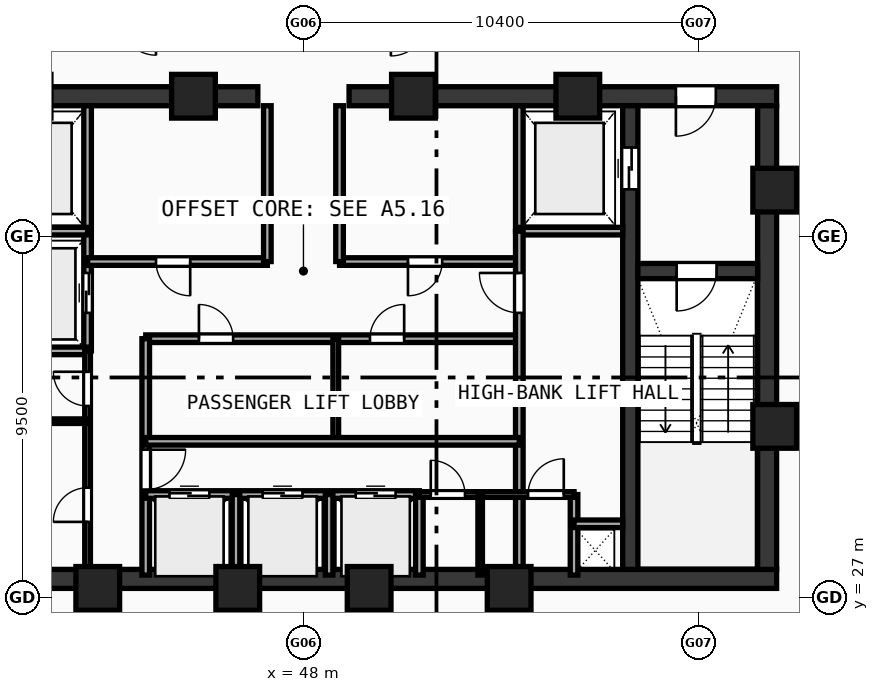
"""IFC4 building model, lengths in metres.
Left out: names, types, materials, properties, quantities, classifications, styles, units other than length and angle.
Written with IfcOpenShell. Run it as: python <this file> out.ifc"""

import sys

from ifc_helpers import new_model, si_unit, direction, frame, frame_2d, origin, origin_with_axes, origin_2d, place, context, subcontext, project, spatial, rectangle, hollow_rectangle, extrude, source, transform, mapped, element, fill, save


model = new_model("IFC4")
c1 = context("Model", 3, precision=1e-05, world=origin(), true_north=direction((0.0, 1.0)))
c2 = subcontext(c1, "Body", "Model", "MODEL_VIEW")
j1 = project(units=[si_unit("LENGTHUNIT", "METRE"), si_unit("PLANEANGLEUNIT", "RADIAN")], contexts=[c1])
p1 = place(None, origin())
s1 = spatial("IfcSite", under=j1, at=p1, CompositionType="ELEMENT")
p2 = place(p1, origin())
s2 = spatial("IfcBuilding", under=s1, at=p2, CompositionType="ELEMENT")
p3 = place(p2, frame((0.0, 0.0, 288.75)))
s3 = spatial("IfcBuildingStorey", under=s2, at=p3, CompositionType="ELEMENT", Elevation=288.75)
p4 = place(p3, frame((35.55, 27.5, 0.0), z_axis=(0.0, 0.0, 1.0), x_axis=(1.0, 0.0, 0.0)))
e1 = element("IfcWall", 1, at=p4, inside=s3, PredefinedType="SHEAR", context=c2, shape_type="SweptSolid", body=[
    extrude(rectangle(XDim=24.9, YDim=0.5, at=frame_2d((12.45, 0.0))), origin(), (0.0, 0.0, 1.0), 3.47),
])
p5 = place(p3, frame((35.55, 40.2, 0.0), z_axis=(0.0, 0.0, 1.0), x_axis=(1.0, 0.0, 0.0)))
e2 = element("IfcWall", 2, at=p5, inside=s3, PredefinedType="SHEAR", context=c2, shape_type="SweptSolid", body=[
    extrude(rectangle(XDim=11.25, YDim=0.5, at=frame_2d((5.625, 0.0))), origin(), (0.0, 0.0, 1.0), 3.47),
])
p6 = place(p5, frame((1.6, 0.0, 0.0)))
e3 = element("IfcOpeningElement", 3, at=p6, cuts=e2, PredefinedType="OPENING", context=c2, shape_type="SweptSolid", body=[
    extrude(rectangle(XDim=1.05, YDim=2.1, at=frame_2d((0.525, 1.05))), frame((0.0, 0.26, 0.0), z_axis=(0.0, -1.0, 0.0), x_axis=(1.0, 0.0, 0.0)), (0.0, 0.0, 1.0), 0.52),
])
p7 = place(p3, frame((49.2, 40.2, 0.0), z_axis=(0.0, 0.0, 1.0), x_axis=(1.0, 0.0, 0.0)))
e4 = element("IfcWall", 4, at=p7, inside=s3, PredefinedType="SHEAR", context=c2, shape_type="SweptSolid", body=[
    extrude(rectangle(XDim=11.25, YDim=0.5, at=frame_2d((5.625, 0.0))), origin(), (0.0, 0.0, 1.0), 3.47),
])
p8 = place(p7, frame((8.6, 0.0, 0.0)))
e5 = element("IfcOpeningElement", 5, at=p8, cuts=e4, PredefinedType="OPENING", context=c2, shape_type="SweptSolid", body=[
    extrude(rectangle(XDim=1.05, YDim=2.1, at=frame_2d((0.525, 1.05))), frame((0.0, 0.26, 0.0), z_axis=(0.0, -1.0, 0.0), x_axis=(1.0, 0.0, 0.0)), (0.0, 0.0, 1.0), 0.52),
])
p9 = place(p3, frame((60.2, 27.75, 0.0), z_axis=(0.0, 0.0, 1.0), x_axis=(0.0, 1.0, 0.0)))
e6 = element("IfcWall", 6, at=p9, inside=s3, PredefinedType="SHEAR", context=c2, shape_type="SweptSolid", body=[
    extrude(rectangle(XDim=12.2, YDim=0.5, at=frame_2d((6.1, 0.0))), origin(), (0.0, 0.0, 1.0), 3.47),
])
p10 = place(p3, frame((56.6, 27.75, 0.0), z_axis=(0.0, 0.0, 1.0), x_axis=(0.0, 1.0, 0.0)))
e7 = element("IfcWall", 7, at=p10, inside=s3, PredefinedType="SHEAR", context=c2, shape_type="SweptSolid", body=[
    extrude(rectangle(XDim=12.2, YDim=0.4, at=frame_2d((6.1, 0.0))), origin(), (0.0, 0.0, 1.0), 3.47),
])
p11 = place(p10, frame((10.0, 0.0, 0.0)))
e8 = element("IfcOpeningElement", 8, at=p11, cuts=e7, PredefinedType="OPENING", context=c2, shape_type="SweptSolid", body=[
    extrude(rectangle(XDim=1.1, YDim=2.1, at=frame_2d((0.55, 1.05))), frame((0.0, 0.21, 0.0), z_axis=(0.0, -1.0, 0.0), x_axis=(1.0, 0.0, 0.0)), (0.0, 0.0, 1.0), 0.42),
])
p12 = place(p3, frame((56.8, 35.6, 0.0), z_axis=(0.0, 0.0, 1.0), x_axis=(1.0, 0.0, 0.0)))
e9 = element("IfcWall", 9, at=p12, inside=s3, PredefinedType="SHEAR", context=c2, shape_type="SweptSolid", body=[
    extrude(rectangle(XDim=3.15, YDim=0.4, at=frame_2d((1.575, 0.0))), origin(), (0.0, 0.0, 1.0), 3.47),
])
p13 = place(p12, frame((1.02, 0.0, 0.0)))
e10 = element("IfcOpeningElement", 10, at=p13, cuts=e9, PredefinedType="OPENING", context=c2, shape_type="SweptSolid", body=[
    extrude(rectangle(XDim=1.05, YDim=2.1, at=frame_2d((0.525, 1.05))), frame((0.0, 0.21, 0.0), z_axis=(0.0, -1.0, 0.0), x_axis=(1.0, 0.0, 0.0)), (0.0, 0.0, 1.0), 0.42),
])
m1 = source(origin(), c2, "Body", "SweptSolid", [
    extrude(hollow_rectangle(XDim=1.15, YDim=1.15, WallThickness=0.048, at=origin_2d()), origin(), (0.0, 0.0, 1.0), 3.73),
])
for number, where, z_axis, x_axis in (
    (11, (42.588, 27.25, -0.26), (0.0, 0.0, 1.0), (1.0, 0.0, 0.0)),
    (12, (46.272, 27.25, -0.26), (0.0, 0.0, 1.0), (1.0, 0.0, 0.0)),
    (13, (49.729, 27.25, -0.26), (0.0, 0.0, 1.0), (1.0, 0.0, 0.0)),
    (14, (53.412, 27.25, -0.26), (0.0, 0.0, 1.0), (1.0, 0.0, 0.0)),
    (15, (60.4, 31.513, -0.26), (0.0, 0.0, 1.0), (1.0, 0.0, 0.0)),
    (16, (60.4, 37.729, -0.26), (0.0, 0.0, 1.0), (1.0, 0.0, 0.0)),
    (17, (55.219, 40.2, -0.26), (0.0, 0.0, 1.0), (1.0, 0.0, 0.0)),
    (18, (50.894, 40.2, -0.26), (0.0, 0.0, 1.0), (1.0, 0.0, 0.0)),
    (19, (45.106, 40.2, -0.26), (0.0, 0.0, 1.0), (1.0, 0.0, 0.0)),
):
    element("IfcColumn", number, at=place(p3, frame(where, z_axis=z_axis, x_axis=x_axis)), inside=s3, PredefinedType="COLUMN", context=c2, shape_type="MappedRepresentation", body=[
        mapped(m1, transform((0.0, 0.0, 0.0), scale=1.0)),
    ])
p14 = place(p3, frame((42.32, 33.5, 0.0), z_axis=(0.0, 0.0, 1.0), x_axis=(0.0, 1.0, 0.0)))
e20 = element("IfcWall", 20, at=p14, inside=s3, PredefinedType="SOLIDWALL", context=c2, shape_type="SweptSolid", body=[
    extrude(rectangle(XDim=6.45, YDim=0.2, at=frame_2d((3.225, 0.0))), origin(), (0.0, 0.0, 1.0), 3.47),
])
p15 = place(p14, frame((1.0, 0.0, 0.0)))
e21 = element("IfcOpeningElement", 21, at=p15, cuts=e20, PredefinedType="OPENING", context=c2, shape_type="SweptSolid", body=[
    extrude(rectangle(XDim=1.05, YDim=2.1, at=frame_2d((0.525, 1.05))), frame((0.0, 0.11, 0.0), z_axis=(0.0, -1.0, 0.0), x_axis=(1.0, 0.0, 0.0)), (0.0, 0.0, 1.0), 0.22),
])
for number, where, z_axis, x_axis in (
    (22, (39.6, 36.65, 0.0), (0.0, 0.0, 1.0), (1.0, 0.0, 0.0)),
    (23, (39.6, 33.5, 0.0), (0.0, 0.0, 1.0), (1.0, 0.0, 0.0)),
):
    element("IfcWall", number, at=place(p3, frame(where, z_axis=z_axis, x_axis=x_axis)), inside=s3, PredefinedType="SOLIDWALL", context=c2, shape_type="SweptSolid", body=[
        extrude(rectangle(XDim=2.72, YDim=0.2, at=frame_2d((1.36, 0.0))), origin(), (0.0, 0.0, 1.0), 3.47),
    ])
p16 = place(p3, frame((53.68, 36.65, 0.0), z_axis=(0.0, 0.0, 1.0), x_axis=(0.0, 1.0, 0.0)))
e24 = element("IfcWall", 24, at=p16, inside=s3, PredefinedType="SOLIDWALL", context=c2, shape_type="SweptSolid", body=[
    extrude(rectangle(XDim=3.3, YDim=0.2, at=frame_2d((1.65, 0.0))), origin(), (0.0, 0.0, 1.0), 3.47),
])
p17 = place(p3, frame((53.68, 36.65, 0.0), z_axis=(0.0, 0.0, 1.0), x_axis=(1.0, 0.0, 0.0)))
e25 = element("IfcWall", 25, at=p17, inside=s3, PredefinedType="SOLIDWALL", context=c2, shape_type="SweptSolid", body=[
    extrude(rectangle(XDim=2.72, YDim=0.2, at=frame_2d((1.36, 0.0))), origin(), (0.0, 0.0, 1.0), 3.47),
])
p18 = place(p3, frame((42.32, 35.85, 0.0), z_axis=(0.0, 0.0, 1.0), x_axis=(1.0, 0.0, 0.0)))
e26 = element("IfcWall", 26, at=p18, inside=s3, PredefinedType="SOLIDWALL", context=c2, shape_type="SweptSolid", body=[
    extrude(rectangle(XDim=4.73, YDim=0.2, at=frame_2d((2.365, 0.0))), origin(), (0.0, 0.0, 1.0), 3.47),
])
p19 = place(p18, frame((1.8, 0.0, 0.0)))
e27 = element("IfcOpeningElement", 27, at=p19, cuts=e26, PredefinedType="OPENING", context=c2, shape_type="SweptSolid", body=[
    extrude(rectangle(XDim=0.9, YDim=2.1, at=frame_2d((0.45, 1.05))), frame((0.0, 0.11, 0.0), z_axis=(0.0, -1.0, 0.0), x_axis=(1.0, 0.0, 0.0)), (0.0, 0.0, 1.0), 0.22),
])
p20 = place(p3, frame((48.95, 35.85, 0.0), z_axis=(0.0, 0.0, 1.0), x_axis=(1.0, 0.0, 0.0)))
e28 = element("IfcWall", 28, at=p20, inside=s3, PredefinedType="SOLIDWALL", context=c2, shape_type="SweptSolid", body=[
    extrude(rectangle(XDim=4.73, YDim=0.2, at=frame_2d((2.365, 0.0))), origin(), (0.0, 0.0, 1.0), 3.47),
])
p21 = place(p20, frame((1.8, 0.0, 0.0)))
e29 = element("IfcOpeningElement", 29, at=p21, cuts=e28, PredefinedType="OPENING", context=c2, shape_type="SweptSolid", body=[
    extrude(rectangle(XDim=0.9, YDim=2.1, at=frame_2d((0.45, 1.05))), frame((0.0, 0.11, 0.0), z_axis=(0.0, -1.0, 0.0), x_axis=(1.0, 0.0, 0.0)), (0.0, 0.0, 1.0), 0.22),
])
for number, where, z_axis, x_axis in (
    (30, (47.05, 35.85, 0.0), (0.0, 0.0, 1.0), (0.0, 1.0, 0.0)),
    (31, (48.95, 35.85, 0.0), (0.0, 0.0, 1.0), (0.0, 1.0, 0.0)),
):
    element("IfcWall", number, at=place(p3, frame(where, z_axis=z_axis, x_axis=x_axis)), inside=s3, PredefinedType="SOLIDWALL", context=c2, shape_type="SweptSolid", body=[
        extrude(rectangle(XDim=4.1, YDim=0.2, at=frame_2d((2.05, 0.0))), origin(), (0.0, 0.0, 1.0), 3.47),
    ])
p22 = place(p3, frame((43.85, 33.82, 0.0), z_axis=(0.0, 0.0, 1.0), x_axis=(1.0, 0.0, 0.0)))
e32 = element("IfcWall", 32, at=p22, inside=s3, PredefinedType="SOLIDWALL", context=c2, shape_type="SweptSolid", body=[
    extrude(rectangle(XDim=9.83, YDim=0.2, at=frame_2d((4.915, 0.0))), origin(), (0.0, 0.0, 1.0), 3.47),
])
p23 = place(p22, frame((1.4, 0.0, 0.0)))
e33 = element("IfcOpeningElement", 33, at=p23, cuts=e32, PredefinedType="OPENING", context=c2, shape_type="SweptSolid", body=[
    extrude(rectangle(XDim=0.9, YDim=2.1, at=frame_2d((0.45, 1.05))), frame((0.0, 0.11, 0.0), z_axis=(0.0, -1.0, 0.0), x_axis=(1.0, 0.0, 0.0)), (0.0, 0.0, 1.0), 0.22),
])
p24 = place(p22, frame((5.9, 0.0, 0.0)))
e34 = element("IfcOpeningElement", 34, at=p24, cuts=e32, PredefinedType="OPENING", context=c2, shape_type="SweptSolid", body=[
    extrude(rectangle(XDim=0.9, YDim=2.1, at=frame_2d((0.45, 1.05))), frame((0.0, 0.11, 0.0), z_axis=(0.0, -1.0, 0.0), x_axis=(1.0, 0.0, 0.0)), (0.0, 0.0, 1.0), 0.22),
])
p25 = place(p3, frame((43.85, 27.6, 0.0), z_axis=(0.0, 0.0, 1.0), x_axis=(0.0, 1.0, 0.0)))
e35 = element("IfcWall", 35, at=p25, inside=s3, PredefinedType="SOLIDWALL", context=c2, shape_type="SweptSolid", body=[
    extrude(rectangle(XDim=6.22, YDim=0.2, at=frame_2d((3.11, 0.0))), origin(), (0.0, 0.0, 1.0), 3.47),
])
p26 = place(p25, frame((2.25, 0.0, 0.0)))
e36 = element("IfcOpeningElement", 36, at=p26, cuts=e35, PredefinedType="OPENING", context=c2, shape_type="SweptSolid", body=[
    extrude(rectangle(XDim=1.05, YDim=2.1, at=frame_2d((0.525, 1.05))), frame((0.0, 0.11, 0.0), z_axis=(0.0, -1.0, 0.0), x_axis=(1.0, 0.0, 0.0)), (0.0, 0.0, 1.0), 0.22),
])
p27 = place(p3, frame((53.68, 27.6, 0.0), z_axis=(0.0, 0.0, 1.0), x_axis=(0.0, 1.0, 0.0)))
e37 = element("IfcWall", 37, at=p27, inside=s3, PredefinedType="SOLIDWALL", context=c2, shape_type="SweptSolid", body=[
    extrude(rectangle(XDim=9.05, YDim=0.2, at=frame_2d((4.525, 0.0))), origin(), (0.0, 0.0, 1.0), 3.47),
])
p28 = place(p27, frame((6.9, 0.0, 0.0)))
e38 = element("IfcOpeningElement", 38, at=p28, cuts=e37, PredefinedType="OPENING", context=c2, shape_type="SweptSolid", body=[
    extrude(rectangle(XDim=1.05, YDim=2.1, at=frame_2d((0.525, 1.05))), frame((0.0, 0.11, 0.0), z_axis=(0.0, -1.0, 0.0), x_axis=(1.0, 0.0, 0.0)), (0.0, 0.0, 1.0), 0.22),
])
p29 = place(p3, frame((48.85, 31.12, 0.0), z_axis=(0.0, 0.0, 1.0), x_axis=(0.0, 1.0, 0.0)))
e39 = element("IfcWall", 39, at=p29, inside=s3, PredefinedType="PARTITIONING", context=c2, shape_type="SweptSolid", body=[
    extrude(rectangle(XDim=2.7, YDim=0.15, at=frame_2d((1.35, 0.0))), origin(), (0.0, 0.0, 1.0), 3.47),
])
p30 = place(p3, frame((43.85, 29.72, 0.0), z_axis=(0.0, 0.0, 1.0), x_axis=(1.0, 0.0, 0.0)))
e40 = element("IfcWall", 40, at=p30, inside=s3, PredefinedType="SOLIDWALL", context=c2, shape_type="SweptSolid", body=[
    extrude(rectangle(XDim=7.2, YDim=0.2, at=frame_2d((3.6, 0.0))), origin(), (0.0, 0.0, 1.0), 3.47),
])
p31 = place(p30, frame((0.625, 0.0, 0.0)))
e41 = element("IfcOpeningElement", 41, at=p31, cuts=e40, PredefinedType="OPENING", context=c2, shape_type="SweptSolid", body=[
    extrude(rectangle(XDim=1.05, YDim=2.1, at=frame_2d((0.525, 1.05))), frame((0.0, 0.11, 0.0), z_axis=(0.0, -1.0, 0.0), x_axis=(1.0, 0.0, 0.0)), (0.0, 0.0, 1.0), 0.22),
])
p32 = place(p30, frame((3.075, 0.0, 0.0)))
e42 = element("IfcOpeningElement", 42, at=p32, cuts=e40, PredefinedType="OPENING", context=c2, shape_type="SweptSolid", body=[
    extrude(rectangle(XDim=1.05, YDim=2.1, at=frame_2d((0.525, 1.05))), frame((0.0, 0.11, 0.0), z_axis=(0.0, -1.0, 0.0), x_axis=(1.0, 0.0, 0.0)), (0.0, 0.0, 1.0), 0.22),
])
p33 = place(p30, frame((5.525, 0.0, 0.0)))
e43 = element("IfcOpeningElement", 43, at=p33, cuts=e40, PredefinedType="OPENING", context=c2, shape_type="SweptSolid", body=[
    extrude(rectangle(XDim=1.05, YDim=2.1, at=frame_2d((0.525, 1.05))), frame((0.0, 0.11, 0.0), z_axis=(0.0, -1.0, 0.0), x_axis=(1.0, 0.0, 0.0)), (0.0, 0.0, 1.0), 0.22),
])
p34 = place(p3, frame((51.05, 27.6, 0.0), z_axis=(0.0, 0.0, 1.0), x_axis=(0.0, 1.0, 0.0)))
e44 = element("IfcWall", 44, at=p34, inside=s3, PredefinedType="SOLIDWALL", context=c2, shape_type="SweptSolid", body=[
    extrude(rectangle(XDim=2.12, YDim=0.2, at=frame_2d((1.06, 0.0))), origin(), (0.0, 0.0, 1.0), 3.47),
])
p35 = place(p3, frame((43.85, 31.12, 0.0), z_axis=(0.0, 0.0, 1.0), x_axis=(1.0, 0.0, 0.0)))
e45 = element("IfcWall", 45, at=p35, inside=s3, PredefinedType="SOLIDWALL", context=c2, shape_type="SweptSolid", body=[
    extrude(rectangle(XDim=9.83, YDim=0.2, at=frame_2d((4.915, 0.0))), origin(), (0.0, 0.0, 1.0), 3.47),
])
for number, where, z_axis, x_axis in (
    (46, (46.225, 27.6, 0.0), (0.0, 0.0, 1.0), (0.0, 1.0, 0.0)),
    (47, (48.675, 27.6, 0.0), (0.0, 0.0, 1.0), (0.0, 1.0, 0.0)),
    (48, (55.12, 27.6, 0.0), (0.0, 0.0, 1.0), (0.0, 1.0, 0.0)),
):
    element("IfcWall", number, at=place(p3, frame(where, z_axis=z_axis, x_axis=x_axis)), inside=s3, PredefinedType="SOLIDWALL", context=c2, shape_type="SweptSolid", body=[
        extrude(rectangle(XDim=2.12, YDim=0.2, at=frame_2d((1.06, 0.0))), origin(), (0.0, 0.0, 1.0), 3.47),
    ])
p36 = place(p3, frame((55.12, 28.95, 0.0), z_axis=(0.0, 0.0, 1.0), x_axis=(1.0, 0.0, 0.0)))
e49 = element("IfcWall", 49, at=p36, inside=s3, PredefinedType="SOLIDWALL", context=c2, shape_type="SweptSolid", body=[
    extrude(rectangle(XDim=1.28, YDim=0.2, at=frame_2d((0.64, 0.0))), origin(), (0.0, 0.0, 1.0), 3.47),
])
p37 = place(p3, frame((42.32, 27.6, 0.0), z_axis=(0.0, 0.0, 1.0), x_axis=(0.0, 1.0, 0.0)))
e50 = element("IfcWall", 50, at=p37, inside=s3, PredefinedType="PARTITIONING", context=c2, shape_type="SweptSolid", body=[
    extrude(rectangle(XDim=5.9, YDim=0.15, at=frame_2d((2.95, 0.0))), origin(), (0.0, 0.0, 1.0), 3.47),
])
p38 = place(p37, frame((1.4, 0.0, 0.0)))
e51 = element("IfcOpeningElement", 51, at=p38, cuts=e50, PredefinedType="OPENING", context=c2, shape_type="SweptSolid", body=[
    extrude(rectangle(XDim=0.9, YDim=2.1, at=frame_2d((0.45, 1.05))), frame((0.0, 0.085, 0.0), z_axis=(0.0, -1.0, 0.0), x_axis=(1.0, 0.0, 0.0)), (0.0, 0.0, 1.0), 0.17),
])
p39 = place(p37, frame((4.45, 0.0, 0.0)))
e52 = element("IfcOpeningElement", 52, at=p39, cuts=e50, PredefinedType="OPENING", context=c2, shape_type="SweptSolid", body=[
    extrude(rectangle(XDim=0.9, YDim=2.1, at=frame_2d((0.45, 1.05))), frame((0.0, 0.085, 0.0), z_axis=(0.0, -1.0, 0.0), x_axis=(1.0, 0.0, 0.0)), (0.0, 0.0, 1.0), 0.17),
])
p40 = place(p3, frame((51.05, 29.72, 0.0), z_axis=(0.0, 0.0, 1.0), x_axis=(1.0, 0.0, 0.0)))
e53 = element("IfcWall", 53, at=p40, inside=s3, PredefinedType="PARTITIONING", context=c2, shape_type="SweptSolid", body=[
    extrude(rectangle(XDim=4.07, YDim=0.15, at=frame_2d((2.035, 0.0))), origin(), (0.0, 0.0, 1.0), 3.47),
])
p41 = place(p40, frame((0.3, 0.0, 0.0)))
e54 = element("IfcOpeningElement", 54, at=p41, cuts=e53, PredefinedType="OPENING", context=c2, shape_type="SweptSolid", body=[
    extrude(rectangle(XDim=0.9, YDim=2.1, at=frame_2d((0.45, 1.05))), frame((0.0, 0.085, 0.0), z_axis=(0.0, -1.0, 0.0), x_axis=(1.0, 0.0, 0.0)), (0.0, 0.0, 1.0), 0.17),
])
p42 = place(p40, frame((2.86, 0.0, 0.0)))
e55 = element("IfcOpeningElement", 55, at=p42, cuts=e53, PredefinedType="OPENING", context=c2, shape_type="SweptSolid", body=[
    extrude(rectangle(XDim=0.94, YDim=2.1, at=frame_2d((0.47, 1.05))), frame((0.0, 0.085, 0.0), z_axis=(0.0, -1.0, 0.0), x_axis=(1.0, 0.0, 0.0)), (0.0, 0.0, 1.0), 0.17),
])
p43 = place(p3, frame((39.6, 31.65, 0.0), z_axis=(0.0, 0.0, 1.0), x_axis=(1.0, 0.0, 0.0)))
e56 = element("IfcWall", 56, at=p43, inside=s3, PredefinedType="PARTITIONING", context=c2, shape_type="SweptSolid", body=[
    extrude(rectangle(XDim=2.72, YDim=0.12, at=frame_2d((1.36, 0.0))), origin(), (0.0, 0.0, 1.0), 3.47),
])
p44 = place(p3, frame((52.65, 27.6, 0.0), z_axis=(0.0, 0.0, 1.0), x_axis=(0.0, 1.0, 0.0)))
e57 = element("IfcWall", 57, at=p44, inside=s3, PredefinedType="PARTITIONING", context=c2, shape_type="SweptSolid", body=[
    extrude(rectangle(XDim=2.12, YDim=0.12, at=frame_2d((1.06, 0.0))), origin(), (0.0, 0.0, 1.0), 3.47),
])
m2 = source(origin(), c2, "Body", "SweptSolid", [
    extrude(rectangle(XDim=1.05, YDim=2.1, at=frame_2d((0.525, 1.05))), frame((0.0, 0.025, 0.0), z_axis=(0.0, -1.0, 0.0), x_axis=(1.0, 0.0, 0.0)), (0.0, 0.0, 1.0), 0.05),
])
p45 = place(p13, frame((1.05, 0.0, 0.0), z_axis=(0.0, 0.0, 1.0), x_axis=(-1.0, 0.0, 0.0)))
e58 = element("IfcDoor", 58, at=p45, inside=s3, OperationType="SINGLE_SWING_RIGHT", PredefinedType="DOOR", context=c2, shape_type="MappedRepresentation", body=[
    mapped(m2, transform((0.0, 0.0, 0.0), scale=1.0)),
])
fill(e10, e58)
p46 = place(p8, frame((1.05, 0.0, 0.0), z_axis=(0.0, 0.0, 1.0), x_axis=(-1.0, 0.0, 0.0)))
e59 = element("IfcDoor", 59, at=p46, inside=s3, OperationType="SINGLE_SWING_RIGHT", PredefinedType="DOOR", context=c2, shape_type="MappedRepresentation", body=[
    mapped(m2, transform((0.0, 0.0, 0.0), scale=1.0)),
])
fill(e5, e59)
m3 = source(origin(), c2, "Body", "SweptSolid", [
    extrude(rectangle(XDim=1.1, YDim=2.1, at=frame_2d((0.55, 1.05))), frame((0.0, 0.025, 0.0), z_axis=(0.0, -1.0, 0.0), x_axis=(1.0, 0.0, 0.0)), (0.0, 0.0, 1.0), 0.05),
])
p47 = place(p11, origin_with_axes())
e60 = element("IfcDoor", 60, at=p47, inside=s3, OperationType="DOUBLE_DOOR_SLIDING", PredefinedType="DOOR", context=c2, shape_type="MappedRepresentation", body=[
    mapped(m3, transform((0.0, 0.0, 0.0), scale=1.0)),
])
fill(e8, e60)
p48 = place(p15, origin_with_axes())
e61 = element("IfcDoor", 61, at=p48, inside=s3, OperationType="DOUBLE_DOOR_SLIDING", PredefinedType="DOOR", context=c2, shape_type="MappedRepresentation", body=[
    mapped(m2, transform((0.0, 0.0, 0.0), scale=1.0)),
])
fill(e21, e61)
m4 = source(origin(), c2, "Body", "SweptSolid", [
    extrude(rectangle(XDim=0.9, YDim=2.1, at=frame_2d((0.45, 1.05))), frame((0.0, 0.025, 0.0), z_axis=(0.0, -1.0, 0.0), x_axis=(1.0, 0.0, 0.0)), (0.0, 0.0, 1.0), 0.05),
])
p49 = place(p19, frame((0.9, 0.0, 0.0), z_axis=(0.0, 0.0, 1.0), x_axis=(-1.0, 0.0, 0.0)))
e62 = element("IfcDoor", 62, at=p49, inside=s3, OperationType="SINGLE_SWING_LEFT", PredefinedType="DOOR", context=c2, shape_type="MappedRepresentation", body=[
    mapped(m4, transform((0.0, 0.0, 0.0), scale=1.0)),
])
fill(e27, e62)
p50 = place(p21, frame((0.9, 0.0, 0.0), z_axis=(0.0, 0.0, 1.0), x_axis=(-1.0, 0.0, 0.0)))
e63 = element("IfcDoor", 63, at=p50, inside=s3, OperationType="SINGLE_SWING_RIGHT", PredefinedType="DOOR", context=c2, shape_type="MappedRepresentation", body=[
    mapped(m4, transform((0.0, 0.0, 0.0), scale=1.0)),
])
fill(e29, e63)
p51 = place(p23, origin_with_axes())
e64 = element("IfcDoor", 64, at=p51, inside=s3, OperationType="SINGLE_SWING_LEFT", PredefinedType="DOOR", context=c2, shape_type="MappedRepresentation", body=[
    mapped(m4, transform((0.0, 0.0, 0.0), scale=1.0)),
])
fill(e33, e64)
p52 = place(p24, origin_with_axes())
e65 = element("IfcDoor", 65, at=p52, inside=s3, OperationType="SINGLE_SWING_RIGHT", PredefinedType="DOOR", context=c2, shape_type="MappedRepresentation", body=[
    mapped(m4, transform((0.0, 0.0, 0.0), scale=1.0)),
])
fill(e34, e65)
p53 = place(p26, frame((1.05, 0.0, 0.0), z_axis=(0.0, 0.0, 1.0), x_axis=(-1.0, 0.0, 0.0)))
e66 = element("IfcDoor", 66, at=p53, inside=s3, OperationType="SINGLE_SWING_LEFT", PredefinedType="DOOR", context=c2, shape_type="MappedRepresentation", body=[
    mapped(m2, transform((0.0, 0.0, 0.0), scale=1.0)),
])
fill(e36, e66)
p54 = place(p28, origin_with_axes())
e67 = element("IfcDoor", 67, at=p54, inside=s3, OperationType="SINGLE_SWING_RIGHT", PredefinedType="DOOR", context=c2, shape_type="MappedRepresentation", body=[
    mapped(m2, transform((0.0, 0.0, 0.0), scale=1.0)),
])
fill(e38, e67)
p55 = place(p31, origin_with_axes())
e68 = element("IfcDoor", 68, at=p55, inside=s3, OperationType="DOUBLE_DOOR_SLIDING", PredefinedType="DOOR", context=c2, shape_type="MappedRepresentation", body=[
    mapped(m2, transform((0.0, 0.0, 0.0), scale=1.0)),
])
fill(e41, e68)
p56 = place(p32, origin_with_axes())
e69 = element("IfcDoor", 69, at=p56, inside=s3, OperationType="DOUBLE_DOOR_SLIDING", PredefinedType="DOOR", context=c2, shape_type="MappedRepresentation", body=[
    mapped(m2, transform((0.0, 0.0, 0.0), scale=1.0)),
])
fill(e42, e69)
p57 = place(p33, origin_with_axes())
e70 = element("IfcDoor", 70, at=p57, inside=s3, OperationType="DOUBLE_DOOR_SLIDING", PredefinedType="DOOR", context=c2, shape_type="MappedRepresentation", body=[
    mapped(m2, transform((0.0, 0.0, 0.0), scale=1.0)),
])
fill(e43, e70)
p58 = place(p38, origin_with_axes())
e71 = element("IfcDoor", 71, at=p58, inside=s3, OperationType="SINGLE_SWING_LEFT", PredefinedType="DOOR", context=c2, shape_type="MappedRepresentation", body=[
    mapped(m4, transform((0.0, 0.0, 0.0), scale=1.0)),
])
fill(e51, e71)
p59 = place(p39, origin_with_axes())
e72 = element("IfcDoor", 72, at=p59, inside=s3, OperationType="SINGLE_SWING_RIGHT", PredefinedType="DOOR", context=c2, shape_type="MappedRepresentation", body=[
    mapped(m4, transform((0.0, 0.0, 0.0), scale=1.0)),
])
fill(e52, e72)
p60 = place(p41, origin_with_axes())
e73 = element("IfcDoor", 73, at=p60, inside=s3, OperationType="SINGLE_SWING_LEFT", PredefinedType="DOOR", context=c2, shape_type="MappedRepresentation", body=[
    mapped(m4, transform((0.0, 0.0, 0.0), scale=1.0)),
])
fill(e54, e73)
m5 = source(origin(), c2, "Body", "SweptSolid", [
    extrude(rectangle(XDim=0.94, YDim=2.1, at=frame_2d((0.47, 1.05))), frame((0.0, 0.025, 0.0), z_axis=(0.0, -1.0, 0.0), x_axis=(1.0, 0.0, 0.0)), (0.0, 0.0, 1.0), 0.05),
])
p61 = place(p42, origin_with_axes())
e74 = element("IfcDoor", 74, at=p61, inside=s3, OperationType="SINGLE_SWING_RIGHT", PredefinedType="DOOR", context=c2, shape_type="MappedRepresentation", body=[
    mapped(m5, transform((0.0, 0.0, 0.0), scale=1.0)),
])
fill(e55, e74)
save(model, sys.argv[1])
